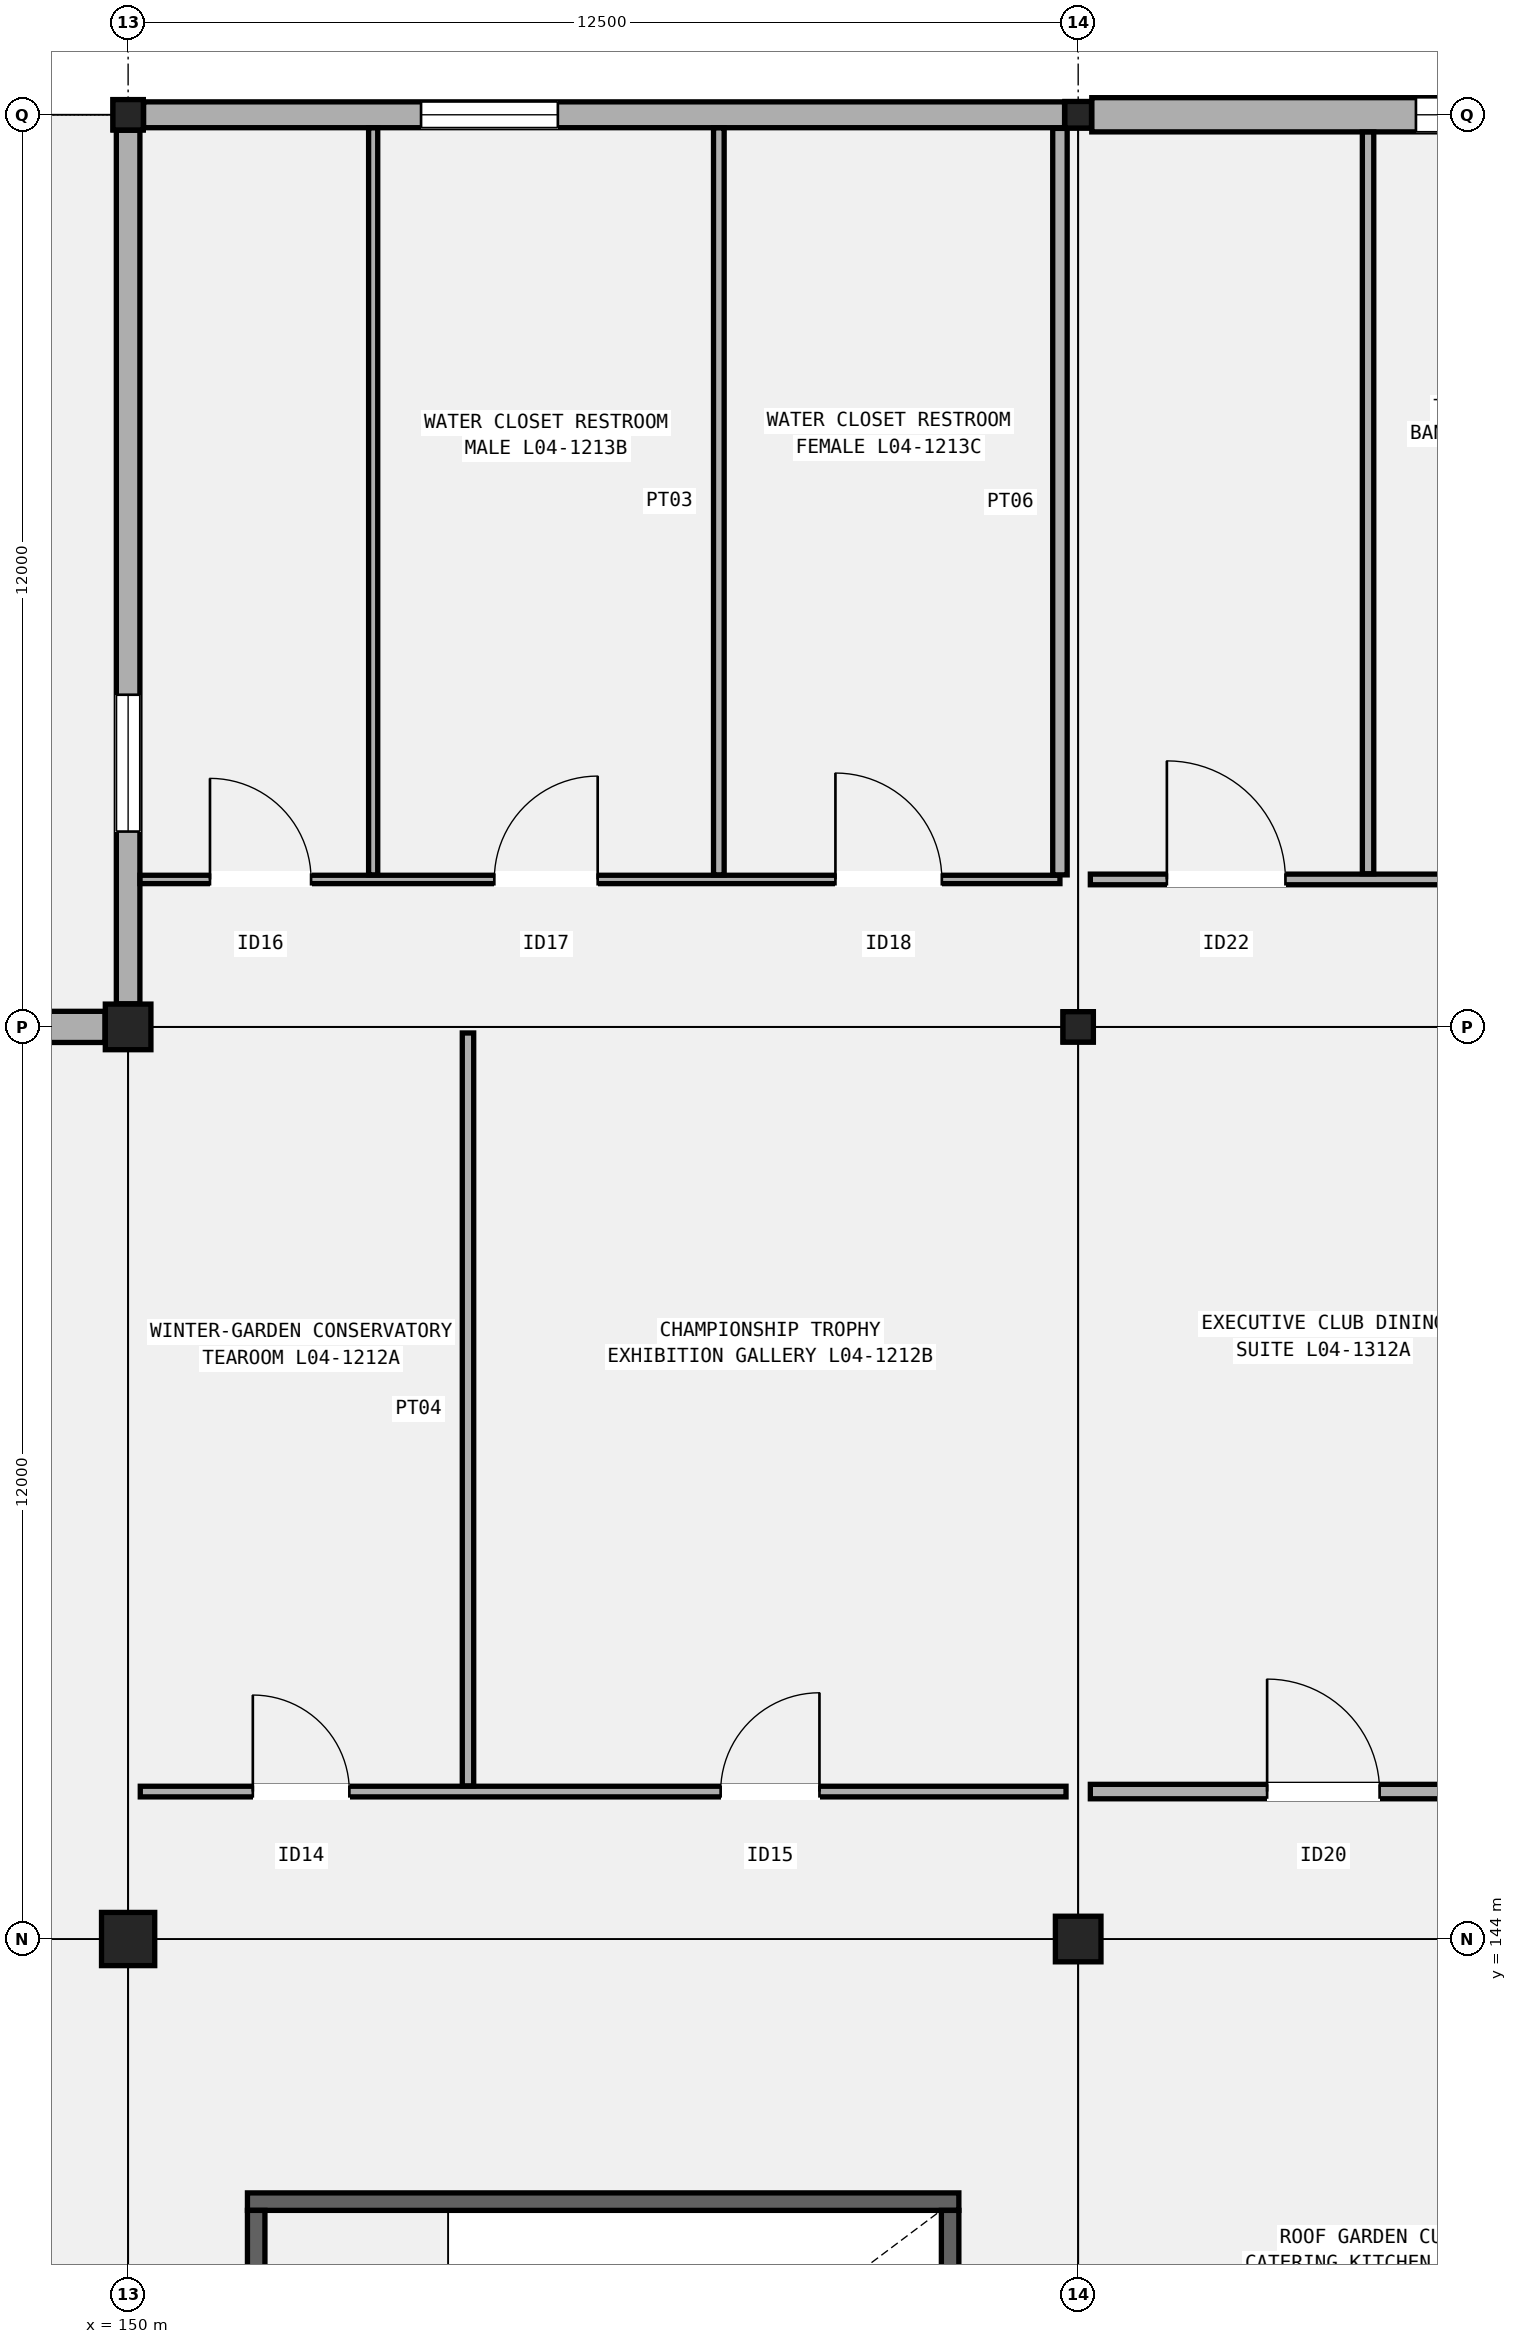
"""IFC4 building model, lengths in metres.
Left out: names, types, materials, properties, quantities, classifications, styles, units other than length and angle.
Written with IfcOpenShell. Run it as: python <this file> out.ifc"""

import sys

from ifc_helpers import new_model, si_unit, direction, frame, frame_2d, origin, origin_2d, place, context, subcontext, project, spatial, rectangle, hollow_rectangle, extrude, element, fill, save


model = new_model("IFC4")
c1 = context("Model", 3, precision=1e-05, world=origin(), true_north=direction((0.0, 1.0)))
c2 = subcontext(c1, "Body", "Model", "MODEL_VIEW")
j1 = project(units=[si_unit("LENGTHUNIT", "METRE"), si_unit("PLANEANGLEUNIT", "RADIAN")], contexts=[c1])
p1 = place(None, origin())
s1 = spatial("IfcSite", under=j1, at=p1, CompositionType="ELEMENT")
p2 = place(p1, origin())
s2 = spatial("IfcBuilding", under=s1, at=p2, CompositionType="ELEMENT")
p3 = place(p2, frame((0.0, 0.0, 20.4)))
s3 = spatial("IfcBuildingStorey", under=s2, at=p3, CompositionType="ELEMENT", Elevation=20.4)
p4 = place(p3, frame((150.0, 144.0, 0.0), z_axis=(0.0, 0.0, 1.0), x_axis=(1.0, 0.0, 0.0)))
e1 = element("IfcColumn", 1, at=p4, inside=s3, PredefinedType="COLUMN", context=c2, shape_type="SweptSolid", body=[
    extrude(rectangle(XDim=0.7, YDim=0.7, at=origin_2d()), origin(), (0.0, 0.0, 1.0), 5.4),
])
p5 = place(p3, frame((150.0, 156.0, 0.0), z_axis=(0.0, 0.0, 1.0), x_axis=(1.0, 0.0, 0.0)))
e2 = element("IfcColumn", 2, at=p5, inside=s3, PredefinedType="COLUMN", context=c2, shape_type="SweptSolid", body=[
    extrude(rectangle(XDim=0.6, YDim=0.6, at=origin_2d()), origin(), (0.0, 0.0, 1.0), 5.4),
])
p6 = place(p3, frame((150.0, 168.0, 0.0), z_axis=(0.0, 0.0, 1.0), x_axis=(1.0, 0.0, 0.0)))
e3 = element("IfcColumn", 3, at=p6, inside=s3, PredefinedType="COLUMN", context=c2, shape_type="SweptSolid", body=[
    extrude(hollow_rectangle(XDim=0.4, YDim=0.4, WallThickness=0.016, InnerFilletRadius=0.016, OuterFilletRadius=0.032, at=origin_2d()), origin(), (0.0, 0.0, 1.0), 5.4),
])
p7 = place(p3, frame((162.5, 144.0, 0.0), z_axis=(0.0, 0.0, 1.0), x_axis=(1.0, 0.0, 0.0)))
e4 = element("IfcColumn", 4, at=p7, inside=s3, PredefinedType="COLUMN", context=c2, shape_type="SweptSolid", body=[
    extrude(rectangle(XDim=0.6, YDim=0.6, at=origin_2d()), origin(), (0.0, 0.0, 1.0), 5.4),
])
p8 = place(p3, frame((162.5, 156.0, 0.0), z_axis=(0.0, 0.0, 1.0), x_axis=(1.0, 0.0, 0.0)))
e5 = element("IfcColumn", 5, at=p8, inside=s3, PredefinedType="COLUMN", context=c2, shape_type="SweptSolid", body=[
    extrude(hollow_rectangle(XDim=0.4, YDim=0.4, WallThickness=0.016, InnerFilletRadius=0.016, OuterFilletRadius=0.032, at=origin_2d()), origin(), (0.0, 0.0, 1.0), 5.4),
])
p9 = place(p3, frame((162.5, 168.0, 0.0), z_axis=(0.0, 0.0, 1.0), x_axis=(1.0, 0.0, 0.0)))
e6 = element("IfcColumn", 6, at=p9, inside=s3, PredefinedType="COLUMN", context=c2, shape_type="SweptSolid", body=[
    extrude(hollow_rectangle(XDim=0.35, YDim=0.35, WallThickness=0.016, InnerFilletRadius=0.016, OuterFilletRadius=0.032, at=origin_2d()), origin(), (0.0, 0.0, 1.0), 5.4),
])
p10 = place(p3, frame((137.854, 156.0, 0.0), z_axis=(0.0, 0.0, 1.0), x_axis=(1.0, 0.0, 0.0)))
e7 = element("IfcWall", 7, at=p10, inside=s3, PredefinedType="SOLIDWALL", context=c2, shape_type="SweptSolid", body=[
    extrude(rectangle(XDim=11.842, YDim=0.41, at=frame_2d((5.921, 0.0))), origin(), (0.0, 0.0, 1.0), 4.48),
])
p11 = place(p10, frame((1.5, 0.0, 0.95)))
e8 = element("IfcOpeningElement", 8, at=p11, cuts=e7, PredefinedType="OPENING", context=c2, shape_type="SweptSolid", body=[
    extrude(rectangle(XDim=1.65, YDim=2.05, at=frame_2d((0.825, 1.025))), frame((0.0, 0.215, 0.0), z_axis=(0.0, -1.0, 0.0), x_axis=(1.0, 0.0, 0.0)), (0.0, 0.0, 1.0), 0.43),
])
p12 = place(p3, frame((150.204, 168.0, 0.0), z_axis=(0.0, 0.0, 1.0), x_axis=(1.0, 0.0, 0.0)))
e9 = element("IfcWall", 9, at=p12, inside=s3, PredefinedType="SOLIDWALL", context=c2, shape_type="SweptSolid", body=[
    extrude(rectangle(XDim=12.117, YDim=0.34, at=frame_2d((6.059, 0.0))), origin(), (0.0, 0.0, 1.0), 4.592),
])
p13 = place(p12, frame((3.65, 0.0, 0.95)))
e10 = element("IfcOpeningElement", 10, at=p13, cuts=e9, PredefinedType="OPENING", context=c2, shape_type="SweptSolid", body=[
    extrude(rectangle(XDim=1.8, YDim=1.75, at=frame_2d((0.9, 0.875))), frame((0.0, 0.18, 0.0), z_axis=(0.0, -1.0, 0.0), x_axis=(1.0, 0.0, 0.0)), (0.0, 0.0, 1.0), 0.36),
])
p14 = place(p3, frame((150.0, 156.304, 0.0), z_axis=(0.0, 0.0, 1.0), x_axis=(0.0, 1.0, 0.0)))
e11 = element("IfcWall", 11, at=p14, inside=s3, PredefinedType="SOLIDWALL", context=c2, shape_type="SweptSolid", body=[
    extrude(rectangle(XDim=11.492, YDim=0.31, at=frame_2d((5.746, 0.0))), origin(), (0.0, 0.0, 1.0), 4.58),
])
p15 = place(p14, frame((2.266, 0.0, 0.95)))
e12 = element("IfcOpeningElement", 12, at=p15, cuts=e11, PredefinedType="OPENING", context=c2, shape_type="SweptSolid", body=[
    extrude(rectangle(XDim=1.8, YDim=2.15, at=frame_2d((0.9, 1.075))), frame((0.0, 0.165, 0.0), z_axis=(0.0, -1.0, 0.0), x_axis=(1.0, 0.0, 0.0)), (0.0, 0.0, 1.0), 0.33),
])
p16 = place(p3, frame((162.679, 168.0, 0.0), z_axis=(0.0, 0.0, 1.0), x_axis=(1.0, 0.0, 0.0)))
e13 = element("IfcWall", 13, at=p16, inside=s3, PredefinedType="SOLIDWALL", context=c2, shape_type="SweptSolid", body=[
    extrude(rectangle(XDim=12.167, YDim=0.45, at=frame_2d((6.083, 0.0))), origin(), (0.0, 0.0, 1.0), 4.48),
])
p17 = place(p16, frame((4.265, 0.0, 0.95)))
e14 = element("IfcOpeningElement", 14, at=p17, cuts=e13, PredefinedType="OPENING", context=c2, shape_type="SweptSolid", body=[
    extrude(rectangle(XDim=1.95, YDim=1.9, at=frame_2d((0.975, 0.95))), frame((0.0, 0.235, 0.0), z_axis=(0.0, -1.0, 0.0), x_axis=(1.0, 0.0, 0.0)), (0.0, 0.0, 1.0), 0.47),
])
p18 = place(p3, frame((151.57, 140.545, 0.0), z_axis=(0.0, 0.0, 1.0), x_axis=(1.0, 0.0, 0.0)))
e15 = element("IfcWall", 15, at=p18, inside=s3, PredefinedType="SHEAR", context=c2, shape_type="SweptSolid", body=[
    extrude(rectangle(XDim=9.36, YDim=0.23, at=frame_2d((4.68, 0.0))), origin(), (0.0, 0.0, 1.0), 5.18),
])
for number, where, z_axis, x_axis in (
    (16, (151.685, 135.57, 0.0), (0.0, 0.0, 1.0), (0.0, 1.0, 0.0)),
    (17, (160.815, 135.57, 0.0), (0.0, 0.0, 1.0), (0.0, 1.0, 0.0)),
):
    element("IfcWall", number, at=place(p3, frame(where, z_axis=z_axis, x_axis=x_axis)), inside=s3, PredefinedType="SHEAR", context=c2, shape_type="SweptSolid", body=[
        extrude(rectangle(XDim=4.86, YDim=0.23, at=frame_2d((2.43, 0.0))), origin(), (0.0, 0.0, 1.0), 5.18),
    ])
p19 = place(p3, frame((150.16, 145.94, 0.0), z_axis=(0.0, 0.0, 1.0), x_axis=(1.0, 0.0, 0.0)))
e18 = element("IfcWall", 18, at=p19, inside=s3, PredefinedType="PARTITIONING", context=c2, shape_type="SweptSolid", body=[
    extrude(rectangle(XDim=12.18, YDim=0.14, at=frame_2d((6.09, 0.0))), origin(), (0.0, 0.0, 1.0), 4.52),
])
p20 = place(p19, frame((1.481, 0.0, 0.0)))
e19 = element("IfcOpeningElement", 19, at=p20, cuts=e18, PredefinedType="OPENING", context=c2, shape_type="SweptSolid", body=[
    extrude(rectangle(XDim=1.27, YDim=2.2, at=frame_2d((0.635, 1.1))), frame((0.0, 0.08, 0.0), z_axis=(0.0, -1.0, 0.0), x_axis=(1.0, 0.0, 0.0)), (0.0, 0.0, 1.0), 0.16),
])
p21 = place(p19, frame((7.636, 0.0, 0.0)))
e20 = element("IfcOpeningElement", 20, at=p21, cuts=e18, PredefinedType="OPENING", context=c2, shape_type="SweptSolid", body=[
    extrude(rectangle(XDim=1.3, YDim=2.24, at=frame_2d((0.65, 1.12))), frame((0.0, 0.08, 0.0), z_axis=(0.0, -1.0, 0.0), x_axis=(1.0, 0.0, 0.0)), (0.0, 0.0, 1.0), 0.16),
])
p22 = place(p3, frame((154.472, 146.015, 0.0), z_axis=(0.0, 0.0, 1.0), x_axis=(0.0, 1.0, 0.0)))
e21 = element("IfcWall", 21, at=p22, inside=s3, PredefinedType="PARTITIONING", context=c2, shape_type="SweptSolid", body=[
    extrude(rectangle(XDim=9.905, YDim=0.15, at=frame_2d((4.953, 0.0))), origin(), (0.0, 0.0, 1.0), 4.52),
])
p23 = place(p3, frame((150.157, 157.94, 0.0), z_axis=(0.0, 0.0, 1.0), x_axis=(1.0, 0.0, 0.0)))
e22 = element("IfcWall", 22, at=p23, inside=s3, PredefinedType="PARTITIONING", context=c2, shape_type="SweptSolid", body=[
    extrude(rectangle(XDim=12.103, YDim=0.11, at=frame_2d((6.052, 0.0))), origin(), (0.0, 0.0, 1.0), 4.52),
])
p24 = place(p23, frame((0.92, 0.0, 0.0)))
e23 = element("IfcOpeningElement", 23, at=p24, cuts=e22, PredefinedType="OPENING", context=c2, shape_type="SweptSolid", body=[
    extrude(rectangle(XDim=1.33, YDim=2.22, at=frame_2d((0.665, 1.11))), frame((0.0, 0.065, 0.0), z_axis=(0.0, -1.0, 0.0), x_axis=(1.0, 0.0, 0.0)), (0.0, 0.0, 1.0), 0.13),
])
p25 = place(p23, frame((4.661, 0.0, 0.0)))
e24 = element("IfcOpeningElement", 24, at=p25, cuts=e22, PredefinedType="OPENING", context=c2, shape_type="SweptSolid", body=[
    extrude(rectangle(XDim=1.36, YDim=2.25, at=frame_2d((0.68, 1.125))), frame((0.0, 0.065, 0.0), z_axis=(0.0, -1.0, 0.0), x_axis=(1.0, 0.0, 0.0)), (0.0, 0.0, 1.0), 0.13),
])
p26 = place(p23, frame((9.149, 0.0, 0.0)))
e25 = element("IfcOpeningElement", 25, at=p26, cuts=e22, PredefinedType="OPENING", context=c2, shape_type="SweptSolid", body=[
    extrude(rectangle(XDim=1.4, YDim=2.24, at=frame_2d((0.7, 1.12))), frame((0.0, 0.065, 0.0), z_axis=(0.0, -1.0, 0.0), x_axis=(1.0, 0.0, 0.0)), (0.0, 0.0, 1.0), 0.13),
])
p27 = place(p3, frame((162.26, 158.0, 0.0), z_axis=(0.0, 0.0, 1.0), x_axis=(0.0, 1.0, 0.0)))
e26 = element("IfcWall", 26, at=p27, inside=s3, PredefinedType="PARTITIONING", context=c2, shape_type="SweptSolid", body=[
    extrude(rectangle(XDim=9.821, YDim=0.19, at=frame_2d((4.911, 0.0))), origin(), (0.0, 0.0, 1.0), 4.52),
])
p28 = place(p3, frame((153.224, 158.0, 0.0), z_axis=(0.0, 0.0, 1.0), x_axis=(0.0, 1.0, 0.0)))
e27 = element("IfcWall", 27, at=p28, inside=s3, PredefinedType="PARTITIONING", context=c2, shape_type="SweptSolid", body=[
    extrude(rectangle(XDim=9.828, YDim=0.12, at=frame_2d((4.914, 0.0))), origin(), (0.0, 0.0, 1.0), 4.52),
])
p29 = place(p3, frame((157.772, 158.0, 0.0), z_axis=(0.0, 0.0, 1.0), x_axis=(0.0, 1.0, 0.0)))
e28 = element("IfcWall", 28, at=p29, inside=s3, PredefinedType="PARTITIONING", context=c2, shape_type="SweptSolid", body=[
    extrude(rectangle(XDim=9.828, YDim=0.14, at=frame_2d((4.914, 0.0))), origin(), (0.0, 0.0, 1.0), 4.52),
])
p30 = place(p3, frame((162.66, 145.94, 0.0), z_axis=(0.0, 0.0, 1.0), x_axis=(1.0, 0.0, 0.0)))
e29 = element("IfcWall", 29, at=p30, inside=s3, PredefinedType="PARTITIONING", context=c2, shape_type="SweptSolid", body=[
    extrude(rectangle(XDim=12.18, YDim=0.19, at=frame_2d((6.09, 0.0))), origin(), (0.0, 0.0, 1.0), 4.52),
])
p31 = place(p30, frame((2.326, 0.0, 0.0)))
e30 = element("IfcOpeningElement", 30, at=p31, cuts=e29, PredefinedType="OPENING", context=c2, shape_type="SweptSolid", body=[
    extrude(rectangle(XDim=1.48, YDim=2.24, at=frame_2d((0.74, 1.12))), frame((0.0, 0.105, 0.0), z_axis=(0.0, -1.0, 0.0), x_axis=(1.0, 0.0, 0.0)), (0.0, 0.0, 1.0), 0.21),
])
p32 = place(p30, frame((8.476, 0.0, 0.0)))
e31 = element("IfcOpeningElement", 31, at=p32, cuts=e29, PredefinedType="OPENING", context=c2, shape_type="SweptSolid", body=[
    extrude(rectangle(XDim=1.52, YDim=2.28, at=frame_2d((0.76, 1.14))), frame((0.0, 0.105, 0.0), z_axis=(0.0, -1.0, 0.0), x_axis=(1.0, 0.0, 0.0)), (0.0, 0.0, 1.0), 0.21),
])
p33 = place(p3, frame((162.66, 157.94, 0.0), z_axis=(0.0, 0.0, 1.0), x_axis=(1.0, 0.0, 0.0)))
e32 = element("IfcWall", 32, at=p33, inside=s3, PredefinedType="PARTITIONING", context=c2, shape_type="SweptSolid", body=[
    extrude(rectangle(XDim=12.133, YDim=0.14, at=frame_2d((6.066, 0.0))), origin(), (0.0, 0.0, 1.0), 4.52),
])
p34 = place(p33, frame((1.007, 0.0, 0.0)))
e33 = element("IfcOpeningElement", 33, at=p34, cuts=e32, PredefinedType="OPENING", context=c2, shape_type="SweptSolid", body=[
    extrude(rectangle(XDim=1.56, YDim=2.26, at=frame_2d((0.78, 1.13))), frame((0.0, 0.08, 0.0), z_axis=(0.0, -1.0, 0.0), x_axis=(1.0, 0.0, 0.0)), (0.0, 0.0, 1.0), 0.16),
])
p35 = place(p33, frame((7.157, 0.0, 0.0)))
e34 = element("IfcOpeningElement", 34, at=p35, cuts=e32, PredefinedType="OPENING", context=c2, shape_type="SweptSolid", body=[
    extrude(rectangle(XDim=1.6, YDim=2.3, at=frame_2d((0.8, 1.15))), frame((0.0, 0.08, 0.0), z_axis=(0.0, -1.0, 0.0), x_axis=(1.0, 0.0, 0.0)), (0.0, 0.0, 1.0), 0.16),
])
p36 = place(p3, frame((166.314, 158.015, 0.0), z_axis=(0.0, 0.0, 1.0), x_axis=(0.0, 1.0, 0.0)))
e35 = element("IfcWall", 35, at=p36, inside=s3, PredefinedType="PARTITIONING", context=c2, shape_type="SweptSolid", body=[
    extrude(rectangle(XDim=9.758, YDim=0.15, at=frame_2d((4.879, 0.0))), origin(), (0.0, 0.0, 1.0), 4.52),
])
p37 = place(p13, origin())
e36 = element("IfcWindow", 36, at=p37, inside=s3, PartitioningType="SINGLE_PANEL", PredefinedType="WINDOW", context=c2, shape_type="SweptSolid", body=[
    extrude(rectangle(XDim=1.8, YDim=1.75, at=frame_2d((0.9, 0.875))), frame((0.0, 0.03, 0.0), z_axis=(0.0, -1.0, 0.0), x_axis=(1.0, 0.0, 0.0)), (0.0, 0.0, 1.0), 0.06),
])
fill(e10, e36)
p38 = place(p15, origin())
e37 = element("IfcWindow", 37, at=p38, inside=s3, PartitioningType="SINGLE_PANEL", PredefinedType="WINDOW", context=c2, shape_type="SweptSolid", body=[
    extrude(rectangle(XDim=1.8, YDim=2.15, at=frame_2d((0.9, 1.075))), frame((0.0, 0.03, 0.0), z_axis=(0.0, -1.0, 0.0), x_axis=(1.0, 0.0, 0.0)), (0.0, 0.0, 1.0), 0.06),
])
fill(e12, e37)
p39 = place(p17, origin())
e38 = element("IfcWindow", 38, at=p39, inside=s3, PartitioningType="SINGLE_PANEL", PredefinedType="WINDOW", context=c2, shape_type="SweptSolid", body=[
    extrude(rectangle(XDim=1.95, YDim=1.9, at=frame_2d((0.975, 0.95))), frame((0.0, 0.03, 0.0), z_axis=(0.0, -1.0, 0.0), x_axis=(1.0, 0.0, 0.0)), (0.0, 0.0, 1.0), 0.06),
])
fill(e14, e38)
p40 = place(p20, origin())
e39 = element("IfcDoor", 39, at=p40, inside=s3, OperationType="SINGLE_SWING_LEFT", PredefinedType="DOOR", context=c2, shape_type="SweptSolid", body=[
    extrude(rectangle(XDim=1.27, YDim=2.2, at=frame_2d((0.635, 1.1))), frame((0.0, 0.025, 0.0), z_axis=(0.0, -1.0, 0.0), x_axis=(1.0, 0.0, 0.0)), (0.0, 0.0, 1.0), 0.05),
])
fill(e19, e39)
p41 = place(p21, origin())
e40 = element("IfcDoor", 40, at=p41, inside=s3, OperationType="SINGLE_SWING_RIGHT", PredefinedType="DOOR", context=c2, shape_type="SweptSolid", body=[
    extrude(rectangle(XDim=1.3, YDim=2.24, at=frame_2d((0.65, 1.12))), frame((0.0, 0.025, 0.0), z_axis=(0.0, -1.0, 0.0), x_axis=(1.0, 0.0, 0.0)), (0.0, 0.0, 1.0), 0.05),
])
fill(e20, e40)
p42 = place(p24, origin())
e41 = element("IfcDoor", 41, at=p42, inside=s3, OperationType="SINGLE_SWING_LEFT", PredefinedType="DOOR", context=c2, shape_type="SweptSolid", body=[
    extrude(rectangle(XDim=1.33, YDim=2.22, at=frame_2d((0.665, 1.11))), frame((0.0, 0.025, 0.0), z_axis=(0.0, -1.0, 0.0), x_axis=(1.0, 0.0, 0.0)), (0.0, 0.0, 1.0), 0.05),
])
fill(e23, e41)
p43 = place(p25, origin())
e42 = element("IfcDoor", 42, at=p43, inside=s3, OperationType="SINGLE_SWING_RIGHT", PredefinedType="DOOR", context=c2, shape_type="SweptSolid", body=[
    extrude(rectangle(XDim=1.36, YDim=2.25, at=frame_2d((0.68, 1.125))), frame((0.0, 0.025, 0.0), z_axis=(0.0, -1.0, 0.0), x_axis=(1.0, 0.0, 0.0)), (0.0, 0.0, 1.0), 0.05),
])
fill(e24, e42)
p44 = place(p26, origin())
e43 = element("IfcDoor", 43, at=p44, inside=s3, OperationType="SINGLE_SWING_LEFT", PredefinedType="DOOR", context=c2, shape_type="SweptSolid", body=[
    extrude(rectangle(XDim=1.4, YDim=2.24, at=frame_2d((0.7, 1.12))), frame((0.0, 0.025, 0.0), z_axis=(0.0, -1.0, 0.0), x_axis=(1.0, 0.0, 0.0)), (0.0, 0.0, 1.0), 0.05),
])
fill(e25, e43)
p45 = place(p31, origin())
e44 = element("IfcDoor", 44, at=p45, inside=s3, OperationType="SINGLE_SWING_LEFT", PredefinedType="DOOR", context=c2, shape_type="SweptSolid", body=[
    extrude(rectangle(XDim=1.48, YDim=2.24, at=frame_2d((0.74, 1.12))), frame((0.0, 0.025, 0.0), z_axis=(0.0, -1.0, 0.0), x_axis=(1.0, 0.0, 0.0)), (0.0, 0.0, 1.0), 0.05),
])
fill(e30, e44)
p46 = place(p34, origin())
e45 = element("IfcDoor", 45, at=p46, inside=s3, OperationType="SINGLE_SWING_LEFT", PredefinedType="DOOR", context=c2, shape_type="SweptSolid", body=[
    extrude(rectangle(XDim=1.56, YDim=2.26, at=frame_2d((0.78, 1.13))), frame((0.0, 0.025, 0.0), z_axis=(0.0, -1.0, 0.0), x_axis=(1.0, 0.0, 0.0)), (0.0, 0.0, 1.0), 0.05),
])
fill(e33, e45)
save(model, sys.argv[1])
